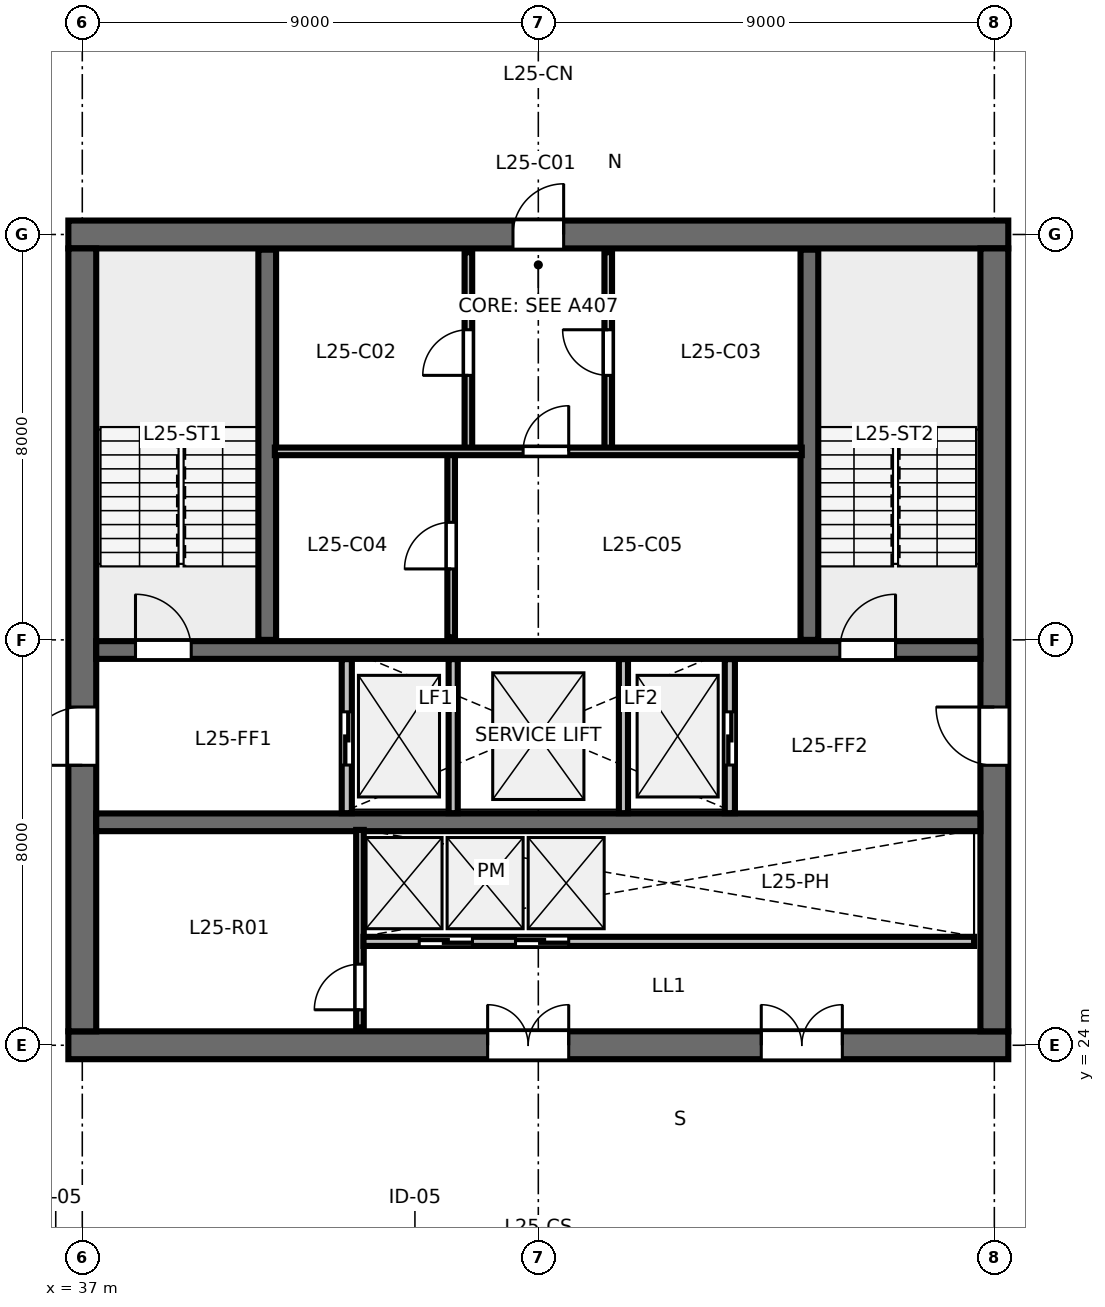
"""IFC4 building model, lengths in metres.
Left out: names, types, materials, properties, quantities, classifications, styles, units other than length and angle.
Written with IfcOpenShell. Run it as: python <this file> out.ifc"""

import sys

from ifc_helpers import new_model, si_unit, direction, frame, frame_2d, origin, place, context, subcontext, project, spatial, rectangle, extrude, element, fill, save


model = new_model("IFC4")
c1 = context("Model", 3, precision=1e-05, world=origin(), true_north=direction((0.0, 1.0)))
c2 = subcontext(c1, "Body", "Model", "MODEL_VIEW")
j1 = project(units=[si_unit("LENGTHUNIT", "METRE"), si_unit("PLANEANGLEUNIT", "RADIAN")], contexts=[c1])
p1 = place(None, origin())
s1 = spatial("IfcSite", under=j1, at=p1, CompositionType="ELEMENT")
p2 = place(p1, origin())
s2 = spatial("IfcBuilding", under=s1, at=p2, CompositionType="ELEMENT")
p3 = place(p2, frame((0.0, 0.0, 98.8)))
s3 = spatial("IfcBuildingStorey", under=s2, at=p3, CompositionType="ELEMENT", Elevation=98.8)
p4 = place(p3, frame((36.725, 24.0, 0.0), z_axis=(0.0, 0.0, 1.0), x_axis=(1.0, 0.0, 0.0)))
e1 = element("IfcWall", 1, at=p4, inside=s3, PredefinedType="SHEAR", context=c2, shape_type="SweptSolid", body=[
    extrude(rectangle(XDim=18.55, YDim=0.55, at=frame_2d((9.275, 0.0))), origin(), (0.0, 0.0, 1.0), 3.36),
])
p5 = place(p4, frame((8.275, 0.0, 0.0)))
e2 = element("IfcOpeningElement", 2, at=p5, cuts=e1, PredefinedType="OPENING", context=c2, shape_type="SweptSolid", body=[
    extrude(rectangle(XDim=1.6, YDim=2.15, at=frame_2d((0.8, 1.075))), frame((0.0, 0.285, 0.0), z_axis=(0.0, -1.0, 0.0), x_axis=(1.0, 0.0, 0.0)), (0.0, 0.0, 1.0), 0.57),
])
p6 = place(p4, frame((13.675, 0.0, 0.0)))
e3 = element("IfcOpeningElement", 3, at=p6, cuts=e1, PredefinedType="OPENING", context=c2, shape_type="SweptSolid", body=[
    extrude(rectangle(XDim=1.6, YDim=2.15, at=frame_2d((0.8, 1.075))), frame((0.0, 0.285, 0.0), z_axis=(0.0, -1.0, 0.0), x_axis=(1.0, 0.0, 0.0)), (0.0, 0.0, 1.0), 0.57),
])
p7 = place(p3, frame((36.725, 40.0, 0.0), z_axis=(0.0, 0.0, 1.0), x_axis=(1.0, 0.0, 0.0)))
e4 = element("IfcWall", 4, at=p7, inside=s3, PredefinedType="SHEAR", context=c2, shape_type="SweptSolid", body=[
    extrude(rectangle(XDim=18.55, YDim=0.55, at=frame_2d((9.275, 0.0))), origin(), (0.0, 0.0, 1.0), 3.36),
])
p8 = place(p7, frame((8.775, 0.0, 0.0)))
e5 = element("IfcOpeningElement", 5, at=p8, cuts=e4, PredefinedType="OPENING", context=c2, shape_type="SweptSolid", body=[
    extrude(rectangle(XDim=1.0, YDim=2.15, at=frame_2d((0.5, 1.075))), frame((0.0, 0.285, 0.0), z_axis=(0.0, -1.0, 0.0), x_axis=(1.0, 0.0, 0.0)), (0.0, 0.0, 1.0), 0.57),
])
p9 = place(p3, frame((37.0, 24.275, 0.0), z_axis=(0.0, 0.0, 1.0), x_axis=(0.0, 1.0, 0.0)))
e6 = element("IfcWall", 6, at=p9, inside=s3, PredefinedType="SHEAR", context=c2, shape_type="SweptSolid", body=[
    extrude(rectangle(XDim=15.45, YDim=0.55, at=frame_2d((7.725, 0.0))), origin(), (0.0, 0.0, 1.0), 3.36),
])
p10 = place(p9, frame((5.25, 0.0, 0.0)))
e7 = element("IfcOpeningElement", 7, at=p10, cuts=e6, PredefinedType="OPENING", context=c2, shape_type="SweptSolid", body=[
    extrude(rectangle(XDim=1.15, YDim=2.15, at=frame_2d((0.575, 1.075))), frame((0.0, 0.285, 0.0), z_axis=(0.0, -1.0, 0.0), x_axis=(1.0, 0.0, 0.0)), (0.0, 0.0, 1.0), 0.57),
])
p11 = place(p3, frame((55.0, 24.275, 0.0), z_axis=(0.0, 0.0, 1.0), x_axis=(0.0, 1.0, 0.0)))
e8 = element("IfcWall", 8, at=p11, inside=s3, PredefinedType="SHEAR", context=c2, shape_type="SweptSolid", body=[
    extrude(rectangle(XDim=15.45, YDim=0.55, at=frame_2d((7.725, 0.0))), origin(), (0.0, 0.0, 1.0), 3.36),
])
p12 = place(p11, frame((5.25, 0.0, 0.0)))
e9 = element("IfcOpeningElement", 9, at=p12, cuts=e8, PredefinedType="OPENING", context=c2, shape_type="SweptSolid", body=[
    extrude(rectangle(XDim=1.15, YDim=2.15, at=frame_2d((0.575, 1.075))), frame((0.0, 0.285, 0.0), z_axis=(0.0, -1.0, 0.0), x_axis=(1.0, 0.0, 0.0)), (0.0, 0.0, 1.0), 0.57),
])
p13 = place(p3, frame((37.275, 31.8, 0.0), z_axis=(0.0, 0.0, 1.0), x_axis=(1.0, 0.0, 0.0)))
e10 = element("IfcWall", 10, at=p13, inside=s3, PredefinedType="SHEAR", context=c2, shape_type="SweptSolid", body=[
    extrude(rectangle(XDim=17.45, YDim=0.35, at=frame_2d((8.725, 0.0))), origin(), (0.0, 0.0, 1.0), 3.36),
])
p14 = place(p13, frame((0.775, 0.0, 0.0)))
e11 = element("IfcOpeningElement", 11, at=p14, cuts=e10, PredefinedType="OPENING", context=c2, shape_type="SweptSolid", body=[
    extrude(rectangle(XDim=1.1, YDim=2.15, at=frame_2d((0.55, 1.075))), frame((0.0, 0.185, 0.0), z_axis=(0.0, -1.0, 0.0), x_axis=(1.0, 0.0, 0.0)), (0.0, 0.0, 1.0), 0.37),
])
p15 = place(p13, frame((14.675, 0.0, 0.0)))
e12 = element("IfcOpeningElement", 12, at=p15, cuts=e10, PredefinedType="OPENING", context=c2, shape_type="SweptSolid", body=[
    extrude(rectangle(XDim=1.1, YDim=2.15, at=frame_2d((0.55, 1.075))), frame((0.0, 0.185, 0.0), z_axis=(0.0, -1.0, 0.0), x_axis=(1.0, 0.0, 0.0)), (0.0, 0.0, 1.0), 0.37),
])
p16 = place(p3, frame((37.275, 28.4, 0.0), z_axis=(0.0, 0.0, 1.0), x_axis=(1.0, 0.0, 0.0)))
e13 = element("IfcWall", 13, at=p16, inside=s3, PredefinedType="SHEAR", context=c2, shape_type="SweptSolid", body=[
    extrude(rectangle(XDim=17.45, YDim=0.35, at=frame_2d((8.725, 0.0))), origin(), (0.0, 0.0, 1.0), 3.36),
])
for number, where, z_axis, x_axis in (
    (14, (40.65, 32.0, 0.0), (0.0, 0.0, 1.0), (0.0, 1.0, 0.0)),
    (15, (51.35, 32.0, 0.0), (0.0, 0.0, 1.0), (0.0, 1.0, 0.0)),
):
    element("IfcWall", number, at=place(p3, frame(where, z_axis=z_axis, x_axis=x_axis)), inside=s3, PredefinedType="SHEAR", context=c2, shape_type="SweptSolid", body=[
        extrude(rectangle(XDim=7.7, YDim=0.35, at=frame_2d((3.85, 0.0))), origin(), (0.0, 0.0, 1.0), 3.6),
    ])
p17 = place(p3, frame((44.62, 35.72, 0.0), z_axis=(0.0, 0.0, 1.0), x_axis=(0.0, 1.0, 0.0)))
e16 = element("IfcWall", 16, at=p17, inside=s3, PredefinedType="PARTITIONING", context=c2, shape_type="SweptSolid", body=[
    extrude(rectangle(XDim=3.93, YDim=0.15, at=frame_2d((1.965, 0.0))), origin(), (0.0, 0.0, 1.0), 3.36),
])
p18 = place(p17, frame((1.5, 0.0, 0.0)))
e17 = element("IfcOpeningElement", 17, at=p18, cuts=e16, PredefinedType="OPENING", context=c2, shape_type="SweptSolid", body=[
    extrude(rectangle(XDim=0.9, YDim=2.15, at=frame_2d((0.45, 1.075))), frame((0.0, 0.085, 0.0), z_axis=(0.0, -1.0, 0.0), x_axis=(1.0, 0.0, 0.0)), (0.0, 0.0, 1.0), 0.17),
])
p19 = place(p3, frame((47.38, 35.72, 0.0), z_axis=(0.0, 0.0, 1.0), x_axis=(0.0, 1.0, 0.0)))
e18 = element("IfcWall", 18, at=p19, inside=s3, PredefinedType="PARTITIONING", context=c2, shape_type="SweptSolid", body=[
    extrude(rectangle(XDim=3.93, YDim=0.15, at=frame_2d((1.965, 0.0))), origin(), (0.0, 0.0, 1.0), 3.36),
])
p20 = place(p19, frame((1.5, 0.0, 0.0)))
e19 = element("IfcOpeningElement", 19, at=p20, cuts=e18, PredefinedType="OPENING", context=c2, shape_type="SweptSolid", body=[
    extrude(rectangle(XDim=0.9, YDim=2.15, at=frame_2d((0.45, 1.075))), frame((0.0, 0.085, 0.0), z_axis=(0.0, -1.0, 0.0), x_axis=(1.0, 0.0, 0.0)), (0.0, 0.0, 1.0), 0.17),
])
p21 = place(p3, frame((44.28, 32.05, 0.0), z_axis=(0.0, 0.0, 1.0), x_axis=(0.0, 1.0, 0.0)))
e20 = element("IfcWall", 20, at=p21, inside=s3, PredefinedType="PARTITIONING", context=c2, shape_type="SweptSolid", body=[
    extrude(rectangle(XDim=3.67, YDim=0.15, at=frame_2d((1.835, 0.0))), origin(), (0.0, 0.0, 1.0), 3.36),
])
p22 = place(p21, frame((1.35, 0.0, 0.0)))
e21 = element("IfcOpeningElement", 21, at=p22, cuts=e20, PredefinedType="OPENING", context=c2, shape_type="SweptSolid", body=[
    extrude(rectangle(XDim=0.92, YDim=2.15, at=frame_2d((0.46, 1.075))), frame((0.0, 0.085, 0.0), z_axis=(0.0, -1.0, 0.0), x_axis=(1.0, 0.0, 0.0)), (0.0, 0.0, 1.0), 0.17),
])
p23 = place(p3, frame((40.8, 35.72, 0.0), z_axis=(0.0, 0.0, 1.0), x_axis=(1.0, 0.0, 0.0)))
e22 = element("IfcWall", 22, at=p23, inside=s3, PredefinedType="PARTITIONING", context=c2, shape_type="SweptSolid", body=[
    extrude(rectangle(XDim=10.4, YDim=0.15, at=frame_2d((5.2, 0.0))), origin(), (0.0, 0.0, 1.0), 3.36),
])
p24 = place(p23, frame((4.9, 0.0, 0.0)))
e23 = element("IfcOpeningElement", 23, at=p24, cuts=e22, PredefinedType="OPENING", context=c2, shape_type="SweptSolid", body=[
    extrude(rectangle(XDim=0.9, YDim=2.15, at=frame_2d((0.45, 1.075))), frame((0.0, 0.085, 0.0), z_axis=(0.0, -1.0, 0.0), x_axis=(1.0, 0.0, 0.0)), (0.0, 0.0, 1.0), 0.17),
])
p25 = place(p3, frame((42.22, 28.58, 0.0), z_axis=(0.0, 0.0, 1.0), x_axis=(0.0, 1.0, 0.0)))
e24 = element("IfcWall", 24, at=p25, inside=s3, PredefinedType="PARTITIONING", context=c2, shape_type="SweptSolid", body=[
    extrude(rectangle(XDim=3.04, YDim=0.2, at=frame_2d((1.52, 0.0))), origin(), (0.0, 0.0, 1.0), 3.36),
])
p26 = place(p25, frame((0.95, 0.0, 0.0)))
e25 = element("IfcOpeningElement", 25, at=p26, cuts=e24, PredefinedType="OPENING", context=c2, shape_type="SweptSolid", body=[
    extrude(rectangle(XDim=1.05, YDim=2.15, at=frame_2d((0.525, 1.075))), frame((0.0, 0.11, 0.0), z_axis=(0.0, -1.0, 0.0), x_axis=(1.0, 0.0, 0.0)), (0.0, 0.0, 1.0), 0.22),
])
p27 = place(p3, frame((49.78, 28.58, 0.0), z_axis=(0.0, 0.0, 1.0), x_axis=(0.0, 1.0, 0.0)))
e26 = element("IfcWall", 26, at=p27, inside=s3, PredefinedType="PARTITIONING", context=c2, shape_type="SweptSolid", body=[
    extrude(rectangle(XDim=3.04, YDim=0.2, at=frame_2d((1.52, 0.0))), origin(), (0.0, 0.0, 1.0), 3.36),
])
p28 = place(p27, frame((0.95, 0.0, 0.0)))
e27 = element("IfcOpeningElement", 27, at=p28, cuts=e26, PredefinedType="OPENING", context=c2, shape_type="SweptSolid", body=[
    extrude(rectangle(XDim=1.05, YDim=2.15, at=frame_2d((0.525, 1.075))), frame((0.0, 0.11, 0.0), z_axis=(0.0, -1.0, 0.0), x_axis=(1.0, 0.0, 0.0)), (0.0, 0.0, 1.0), 0.22),
])
for number, where, z_axis, x_axis in (
    (28, (44.32, 28.58, 0.0), (0.0, 0.0, 1.0), (0.0, 1.0, 0.0)),
    (29, (47.68, 28.58, 0.0), (0.0, 0.0, 1.0), (0.0, 1.0, 0.0)),
):
    element("IfcWall", number, at=place(p3, frame(where, z_axis=z_axis, x_axis=x_axis)), inside=s3, PredefinedType="PARTITIONING", context=c2, shape_type="SweptSolid", body=[
        extrude(rectangle(XDim=3.04, YDim=0.18, at=frame_2d((1.52, 0.0))), origin(), (0.0, 0.0, 1.0), 3.36),
    ])
p29 = place(p3, frame((42.48, 24.35, 0.0), z_axis=(0.0, 0.0, 1.0), x_axis=(0.0, 1.0, 0.0)))
e30 = element("IfcWall", 30, at=p29, inside=s3, PredefinedType="PARTITIONING", context=c2, shape_type="SweptSolid", body=[
    extrude(rectangle(XDim=3.9, YDim=0.15, at=frame_2d((1.95, 0.0))), origin(), (0.0, 0.0, 1.0), 3.36),
])
p30 = place(p29, frame((0.35, 0.0, 0.0)))
e31 = element("IfcOpeningElement", 31, at=p30, cuts=e30, PredefinedType="OPENING", context=c2, shape_type="SweptSolid", body=[
    extrude(rectangle(XDim=0.9, YDim=2.15, at=frame_2d((0.45, 1.075))), frame((0.0, 0.085, 0.0), z_axis=(0.0, -1.0, 0.0), x_axis=(1.0, 0.0, 0.0)), (0.0, 0.0, 1.0), 0.17),
])
p31 = place(p3, frame((42.55, 26.05, 0.0), z_axis=(0.0, 0.0, 1.0), x_axis=(1.0, 0.0, 0.0)))
e32 = element("IfcWall", 32, at=p31, inside=s3, PredefinedType="PARTITIONING", context=c2, shape_type="SweptSolid", body=[
    extrude(rectangle(XDim=12.05, YDim=0.18, at=frame_2d((6.025, 0.0))), origin(), (0.0, 0.0, 1.0), 3.36),
])
p32 = place(p31, frame((1.1, 0.0, 0.0)))
e33 = element("IfcOpeningElement", 33, at=p32, cuts=e32, PredefinedType="OPENING", context=c2, shape_type="SweptSolid", body=[
    extrude(rectangle(XDim=1.05, YDim=2.15, at=frame_2d((0.525, 1.075))), frame((0.0, 0.1, 0.0), z_axis=(0.0, -1.0, 0.0), x_axis=(1.0, 0.0, 0.0)), (0.0, 0.0, 1.0), 0.2),
])
p33 = place(p31, frame((3.0, 0.0, 0.0)))
e34 = element("IfcOpeningElement", 34, at=p33, cuts=e32, PredefinedType="OPENING", context=c2, shape_type="SweptSolid", body=[
    extrude(rectangle(XDim=1.05, YDim=2.15, at=frame_2d((0.525, 1.075))), frame((0.0, 0.1, 0.0), z_axis=(0.0, -1.0, 0.0), x_axis=(1.0, 0.0, 0.0)), (0.0, 0.0, 1.0), 0.2),
])
p34 = place(p14, origin())
e35 = element("IfcDoor", 35, at=p34, inside=s3, OperationType="SINGLE_SWING_LEFT", PredefinedType="DOOR", context=c2, shape_type="SweptSolid", body=[
    extrude(rectangle(XDim=1.1, YDim=2.15, at=frame_2d((0.55, 1.075))), frame((0.0, 0.025, 0.0), z_axis=(0.0, -1.0, 0.0), x_axis=(1.0, 0.0, 0.0)), (0.0, 0.0, 1.0), 0.05),
])
fill(e11, e35)
p35 = place(p15, origin())
e36 = element("IfcDoor", 36, at=p35, inside=s3, OperationType="SINGLE_SWING_RIGHT", PredefinedType="DOOR", context=c2, shape_type="SweptSolid", body=[
    extrude(rectangle(XDim=1.1, YDim=2.15, at=frame_2d((0.55, 1.075))), frame((0.0, 0.025, 0.0), z_axis=(0.0, -1.0, 0.0), x_axis=(1.0, 0.0, 0.0)), (0.0, 0.0, 1.0), 0.05),
])
fill(e12, e36)
p36 = place(p8, origin())
e37 = element("IfcDoor", 37, at=p36, inside=s3, OperationType="SINGLE_SWING_RIGHT", PredefinedType="DOOR", context=c2, shape_type="SweptSolid", body=[
    extrude(rectangle(XDim=1.0, YDim=2.15, at=frame_2d((0.5, 1.075))), frame((0.0, 0.025, 0.0), z_axis=(0.0, -1.0, 0.0), x_axis=(1.0, 0.0, 0.0)), (0.0, 0.0, 1.0), 0.05),
])
fill(e5, e37)
p37 = place(p10, origin())
e38 = element("IfcDoor", 38, at=p37, inside=s3, OperationType="SINGLE_SWING_LEFT", PredefinedType="DOOR", context=c2, shape_type="SweptSolid", body=[
    extrude(rectangle(XDim=1.15, YDim=2.15, at=frame_2d((0.575, 1.075))), frame((0.0, 0.025, 0.0), z_axis=(0.0, -1.0, 0.0), x_axis=(1.0, 0.0, 0.0)), (0.0, 0.0, 1.0), 0.05),
])
fill(e7, e38)
p38 = place(p12, origin())
e39 = element("IfcDoor", 39, at=p38, inside=s3, OperationType="SINGLE_SWING_RIGHT", PredefinedType="DOOR", context=c2, shape_type="SweptSolid", body=[
    extrude(rectangle(XDim=1.15, YDim=2.15, at=frame_2d((0.575, 1.075))), frame((0.0, 0.025, 0.0), z_axis=(0.0, -1.0, 0.0), x_axis=(1.0, 0.0, 0.0)), (0.0, 0.0, 1.0), 0.05),
])
fill(e9, e39)
p39 = place(p5, origin())
e40 = element("IfcDoor", 40, at=p39, inside=s3, OperationType="DOUBLE_DOOR_SINGLE_SWING", PredefinedType="DOOR", context=c2, shape_type="SweptSolid", body=[
    extrude(rectangle(XDim=1.6, YDim=2.15, at=frame_2d((0.8, 1.075))), frame((0.0, 0.025, 0.0), z_axis=(0.0, -1.0, 0.0), x_axis=(1.0, 0.0, 0.0)), (0.0, 0.0, 1.0), 0.05),
])
fill(e2, e40)
p40 = place(p6, origin())
e41 = element("IfcDoor", 41, at=p40, inside=s3, OperationType="DOUBLE_DOOR_SINGLE_SWING", PredefinedType="DOOR", context=c2, shape_type="SweptSolid", body=[
    extrude(rectangle(XDim=1.6, YDim=2.15, at=frame_2d((0.8, 1.075))), frame((0.0, 0.025, 0.0), z_axis=(0.0, -1.0, 0.0), x_axis=(1.0, 0.0, 0.0)), (0.0, 0.0, 1.0), 0.05),
])
fill(e3, e41)
p41 = place(p18, origin())
e42 = element("IfcDoor", 42, at=p41, inside=s3, OperationType="SINGLE_SWING_LEFT", PredefinedType="DOOR", context=c2, shape_type="SweptSolid", body=[
    extrude(rectangle(XDim=0.9, YDim=2.15, at=frame_2d((0.45, 1.075))), frame((0.0, 0.025, 0.0), z_axis=(0.0, -1.0, 0.0), x_axis=(1.0, 0.0, 0.0)), (0.0, 0.0, 1.0), 0.05),
])
fill(e17, e42)
p42 = place(p20, origin())
e43 = element("IfcDoor", 43, at=p42, inside=s3, OperationType="SINGLE_SWING_RIGHT", PredefinedType="DOOR", context=c2, shape_type="SweptSolid", body=[
    extrude(rectangle(XDim=0.9, YDim=2.15, at=frame_2d((0.45, 1.075))), frame((0.0, 0.025, 0.0), z_axis=(0.0, -1.0, 0.0), x_axis=(1.0, 0.0, 0.0)), (0.0, 0.0, 1.0), 0.05),
])
fill(e19, e43)
p43 = place(p22, origin())
e44 = element("IfcDoor", 44, at=p43, inside=s3, OperationType="SINGLE_SWING_LEFT", PredefinedType="DOOR", context=c2, shape_type="SweptSolid", body=[
    extrude(rectangle(XDim=0.92, YDim=2.15, at=frame_2d((0.46, 1.075))), frame((0.0, 0.025, 0.0), z_axis=(0.0, -1.0, 0.0), x_axis=(1.0, 0.0, 0.0)), (0.0, 0.0, 1.0), 0.05),
])
fill(e21, e44)
p44 = place(p24, origin())
e45 = element("IfcDoor", 45, at=p44, inside=s3, OperationType="SINGLE_SWING_RIGHT", PredefinedType="DOOR", context=c2, shape_type="SweptSolid", body=[
    extrude(rectangle(XDim=0.9, YDim=2.15, at=frame_2d((0.45, 1.075))), frame((0.0, 0.025, 0.0), z_axis=(0.0, -1.0, 0.0), x_axis=(1.0, 0.0, 0.0)), (0.0, 0.0, 1.0), 0.05),
])
fill(e23, e45)
p45 = place(p26, origin())
e46 = element("IfcDoor", 46, at=p45, inside=s3, OperationType="SLIDING_TO_LEFT", PredefinedType="DOOR", context=c2, shape_type="SweptSolid", body=[
    extrude(rectangle(XDim=1.05, YDim=2.15, at=frame_2d((0.525, 1.075))), frame((0.0, 0.025, 0.0), z_axis=(0.0, -1.0, 0.0), x_axis=(1.0, 0.0, 0.0)), (0.0, 0.0, 1.0), 0.05),
])
fill(e25, e46)
p46 = place(p28, origin())
e47 = element("IfcDoor", 47, at=p46, inside=s3, OperationType="SLIDING_TO_RIGHT", PredefinedType="DOOR", context=c2, shape_type="SweptSolid", body=[
    extrude(rectangle(XDim=1.05, YDim=2.15, at=frame_2d((0.525, 1.075))), frame((0.0, 0.025, 0.0), z_axis=(0.0, -1.0, 0.0), x_axis=(1.0, 0.0, 0.0)), (0.0, 0.0, 1.0), 0.05),
])
fill(e27, e47)
p47 = place(p30, origin())
e48 = element("IfcDoor", 48, at=p47, inside=s3, OperationType="SINGLE_SWING_LEFT", PredefinedType="DOOR", context=c2, shape_type="SweptSolid", body=[
    extrude(rectangle(XDim=0.9, YDim=2.15, at=frame_2d((0.45, 1.075))), frame((0.0, 0.025, 0.0), z_axis=(0.0, -1.0, 0.0), x_axis=(1.0, 0.0, 0.0)), (0.0, 0.0, 1.0), 0.05),
])
fill(e31, e48)
p48 = place(p32, origin())
e49 = element("IfcDoor", 49, at=p48, inside=s3, OperationType="SLIDING_TO_LEFT", PredefinedType="DOOR", context=c2, shape_type="SweptSolid", body=[
    extrude(rectangle(XDim=1.05, YDim=2.15, at=frame_2d((0.525, 1.075))), frame((0.0, 0.025, 0.0), z_axis=(0.0, -1.0, 0.0), x_axis=(1.0, 0.0, 0.0)), (0.0, 0.0, 1.0), 0.05),
])
fill(e33, e49)
p49 = place(p33, origin())
e50 = element("IfcDoor", 50, at=p49, inside=s3, OperationType="SLIDING_TO_RIGHT", PredefinedType="DOOR", context=c2, shape_type="SweptSolid", body=[
    extrude(rectangle(XDim=1.05, YDim=2.15, at=frame_2d((0.525, 1.075))), frame((0.0, 0.025, 0.0), z_axis=(0.0, -1.0, 0.0), x_axis=(1.0, 0.0, 0.0)), (0.0, 0.0, 1.0), 0.05),
])
fill(e34, e50)
save(model, sys.argv[1])
